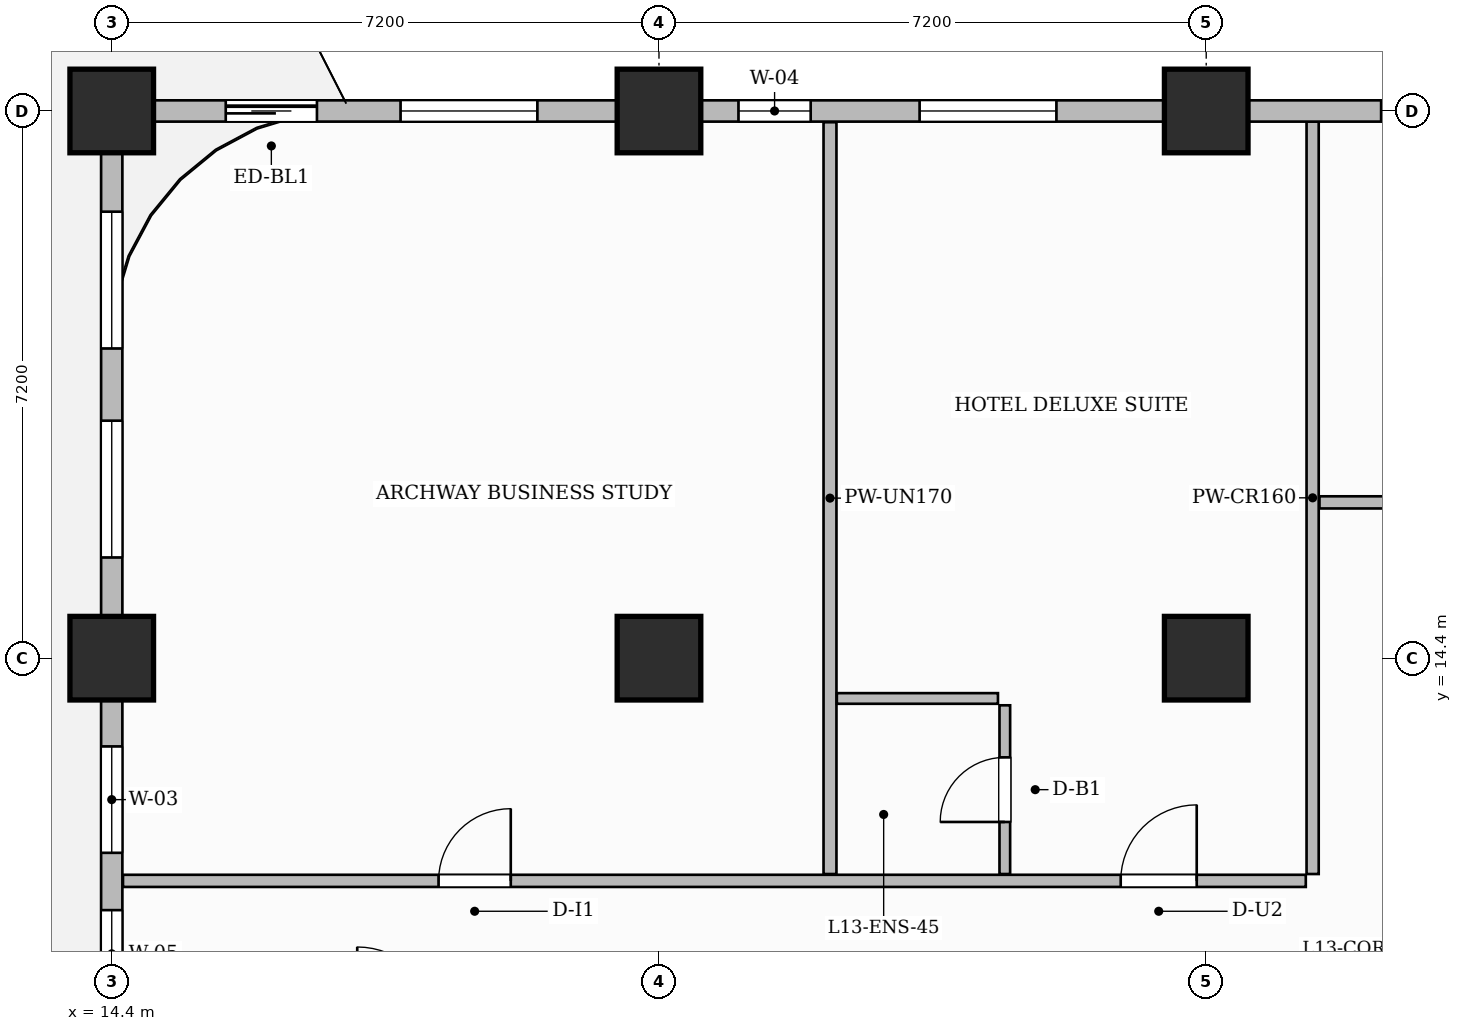
"""IFC4 building model, lengths in metres.
Left out: names, types, materials, properties, quantities, classifications, styles, units other than length and angle.
Written with IfcOpenShell. Run it as: python <this file> out.ifc"""

import sys

from ifc_helpers import new_model, si_unit, direction, frame, frame_2d, origin, origin_2d, place, context, subcontext, project, spatial, rectangle, extrude, source, transform, mapped, element, fill, save


model = new_model("IFC4")
c1 = context("Model", 3, precision=1e-05, world=origin(), true_north=direction((0.0, 1.0)))
c2 = subcontext(c1, "Body", "Model", "MODEL_VIEW")
j1 = project(units=[si_unit("LENGTHUNIT", "METRE"), si_unit("PLANEANGLEUNIT", "RADIAN")], contexts=[c1])
p1 = place(None, origin())
s1 = spatial("IfcSite", under=j1, at=p1, CompositionType="ELEMENT")
p2 = place(p1, origin())
s2 = spatial("IfcBuilding", under=s1, at=p2, CompositionType="ELEMENT")
p3 = place(p2, frame((0.0, 0.0, 58.3)))
s3 = spatial("IfcBuildingStorey", under=s2, at=p3, CompositionType="ELEMENT", Elevation=58.3)
m1 = source(origin(), c2, "Body", "SweptSolid", [
    extrude(rectangle(XDim=1.1, YDim=1.1, at=origin_2d()), origin(), (0.0, 0.0, 1.0), 3.7),
])
for number, where, z_axis, x_axis in (
    (1, (14.4, 14.4, 0.0), (0.0, 0.0, 1.0), (1.0, 0.0, 0.0)),
    (2, (14.4, 21.6, 0.0), (0.0, 0.0, 1.0), (1.0, 0.0, 0.0)),
    (3, (21.6, 14.4, 0.0), (0.0, 0.0, 1.0), (1.0, 0.0, 0.0)),
    (4, (21.6, 21.6, 0.0), (0.0, 0.0, 1.0), (1.0, 0.0, 0.0)),
    (5, (28.8, 14.4, 0.0), (0.0, 0.0, 1.0), (1.0, 0.0, 0.0)),
    (6, (28.8, 21.6, 0.0), (0.0, 0.0, 1.0), (1.0, 0.0, 0.0)),
):
    element("IfcColumn", number, at=place(p3, frame(where, z_axis=z_axis, x_axis=x_axis)), inside=s3, PredefinedType="COLUMN", context=c2, shape_type="MappedRepresentation", body=[
        mapped(m1, transform((0.0, 0.0, 0.0), scale=1.0)),
    ])
p4 = place(p3, frame((14.548, 11.47, 0.0), z_axis=(0.0, 0.0, 1.0), x_axis=(1.0, 0.0, 0.0)))
e7 = element("IfcWall", 7, at=p4, inside=s3, PredefinedType="PARTITIONING", context=c2, shape_type="SweptSolid", body=[
    extrude(rectangle(XDim=15.562, YDim=0.16, at=frame_2d((7.781, 0.0))), origin(), (0.0, 0.0, 1.0), 3.45),
])
p5 = place(p4, frame((4.152, 0.0, 0.0)))
e8 = element("IfcOpeningElement", 8, at=p5, cuts=e7, PredefinedType="OPENING", context=c2, shape_type="SweptSolid", body=[
    extrude(rectangle(XDim=0.95, YDim=2.15, at=frame_2d((0.475, 1.075))), frame((0.0, 0.09, 0.0), z_axis=(0.0, -1.0, 0.0), x_axis=(1.0, 0.0, 0.0)), (0.0, 0.0, 1.0), 0.18),
])
p6 = place(p4, frame((13.127, 0.0, 0.0)))
e9 = element("IfcOpeningElement", 9, at=p6, cuts=e7, PredefinedType="OPENING", context=c2, shape_type="SweptSolid", body=[
    extrude(rectangle(XDim=1.0, YDim=2.2, at=frame_2d((0.5, 1.1))), frame((0.0, 0.09, 0.0), z_axis=(0.0, -1.0, 0.0), x_axis=(1.0, 0.0, 0.0)), (0.0, 0.0, 1.0), 0.18),
])
p7 = place(p3, frame((30.2, 11.56, 0.0), z_axis=(0.0, 0.0, 1.0), x_axis=(0.0, 1.0, 0.0)))
e10 = element("IfcWall", 10, at=p7, inside=s3, PredefinedType="PARTITIONING", context=c2, shape_type="SweptSolid", body=[
    extrude(rectangle(XDim=9.9, YDim=0.16, at=frame_2d((4.95, 0.0))), origin(), (0.0, 0.0, 1.0), 3.45),
])
p8 = place(p3, frame((30.29, 16.45, 0.0), z_axis=(0.0, 0.0, 1.0), x_axis=(1.0, 0.0, 0.0)))
e11 = element("IfcWall", 11, at=p8, inside=s3, PredefinedType="PARTITIONING", context=c2, shape_type="SweptSolid", body=[
    extrude(rectangle(XDim=19.37, YDim=0.16, at=frame_2d((9.685, 0.0))), origin(), (0.0, 0.0, 1.0), 3.45),
])
p9 = place(p8, frame((1.285, 0.0, 0.0)))
e12 = element("IfcOpeningElement", 12, at=p9, cuts=e11, PredefinedType="OPENING", context=c2, shape_type="SweptSolid", body=[
    extrude(rectangle(XDim=0.85, YDim=2.1, at=frame_2d((0.425, 1.05))), frame((0.0, 0.09, 0.0), z_axis=(0.0, -1.0, 0.0), x_axis=(1.0, 0.0, 0.0)), (0.0, 0.0, 1.0), 0.18),
])
p10 = place(p8, frame((10.66, 0.0, 0.0)))
e13 = element("IfcOpeningElement", 13, at=p10, cuts=e11, PredefinedType="OPENING", context=c2, shape_type="SweptSolid", body=[
    extrude(rectangle(XDim=1.6, YDim=2.4, at=frame_2d((0.8, 1.2))), frame((0.0, 0.09, 0.0), z_axis=(0.0, -1.0, 0.0), x_axis=(1.0, 0.0, 0.0)), (0.0, 0.0, 1.0), 0.18),
])
p11 = place(p3, frame((23.85, 11.56, 0.0), z_axis=(0.0, 0.0, 1.0), x_axis=(0.0, 1.0, 0.0)))
e14 = element("IfcWall", 14, at=p11, inside=s3, PredefinedType="PARTITIONING", context=c2, shape_type="SweptSolid", body=[
    extrude(rectangle(XDim=9.892, YDim=0.17, at=frame_2d((4.946, 0.0))), origin(), (0.0, 0.0, 1.0), 3.45),
])
p12 = place(p3, frame((26.15, 11.56, 0.0), z_axis=(0.0, 0.0, 1.0), x_axis=(0.0, 1.0, 0.0)))
e15 = element("IfcWall", 15, at=p12, inside=s3, PredefinedType="PARTITIONING", context=c2, shape_type="SweptSolid", body=[
    extrude(rectangle(XDim=2.22, YDim=0.14, at=frame_2d((1.11, 0.0))), origin(), (0.0, 0.0, 1.0), 3.45),
])
p13 = place(p12, frame((0.685, 0.0, 0.0)))
e16 = element("IfcOpeningElement", 16, at=p13, cuts=e15, PredefinedType="OPENING", context=c2, shape_type="SweptSolid", body=[
    extrude(rectangle(XDim=0.85, YDim=2.1, at=frame_2d((0.425, 1.05))), frame((0.0, 0.08, 0.0), z_axis=(0.0, -1.0, 0.0), x_axis=(1.0, 0.0, 0.0)), (0.0, 0.0, 1.0), 0.16),
])
p14 = place(p3, frame((23.94, 13.87, 0.0), z_axis=(0.0, 0.0, 1.0), x_axis=(1.0, 0.0, 0.0)))
e17 = element("IfcWall", 17, at=p14, inside=s3, PredefinedType="PARTITIONING", context=c2, shape_type="SweptSolid", body=[
    extrude(rectangle(XDim=2.12, YDim=0.14, at=frame_2d((1.06, 0.0))), origin(), (0.0, 0.0, 1.0), 3.45),
])
p15 = place(p3, frame((14.4, 21.6, 0.0), z_axis=(0.0, 0.0, 1.0), x_axis=(1.0, 0.0, 0.0)))
e18 = element("IfcWall", 18, at=p15, inside=s3, PredefinedType="SOLIDWALL", context=c2, shape_type="SweptSolid", body=[
    extrude(rectangle(XDim=43.2, YDim=0.28, at=frame_2d((21.6, 0.0))), origin(), (0.0, 0.0, 1.0), 2.885),
])
p16 = place(p15, frame((1.5, 0.0, 0.0)))
e19 = element("IfcOpeningElement", 19, at=p16, cuts=e18, PredefinedType="OPENING", context=c2, shape_type="SweptSolid", body=[
    extrude(rectangle(XDim=1.2, YDim=2.2, at=frame_2d((0.6, 1.1))), frame((0.0, 0.15, 0.0), z_axis=(0.0, -1.0, 0.0), x_axis=(1.0, 0.0, 0.0)), (0.0, 0.0, 1.0), 0.3),
])
p17 = place(p15, frame((3.8, 0.0, 0.8)))
e20 = element("IfcOpeningElement", 20, at=p17, cuts=e18, PredefinedType="OPENING", context=c2, shape_type="SweptSolid", body=[
    extrude(rectangle(XDim=1.8, YDim=1.85, at=frame_2d((0.9, 0.925))), frame((0.0, 0.15, 0.0), z_axis=(0.0, -1.0, 0.0), x_axis=(1.0, 0.0, 0.0)), (0.0, 0.0, 1.0), 0.3),
])
p18 = place(p15, frame((8.246, 0.0, 0.8)))
e21 = element("IfcOpeningElement", 21, at=p18, cuts=e18, PredefinedType="OPENING", context=c2, shape_type="SweptSolid", body=[
    extrude(rectangle(XDim=0.95, YDim=1.75, at=frame_2d((0.475, 0.875))), frame((0.0, 0.15, 0.0), z_axis=(0.0, -1.0, 0.0), x_axis=(1.0, 0.0, 0.0)), (0.0, 0.0, 1.0), 0.3),
])
p19 = place(p15, frame((10.629, 0.0, 0.8)))
e22 = element("IfcOpeningElement", 22, at=p19, cuts=e18, PredefinedType="OPENING", context=c2, shape_type="SweptSolid", body=[
    extrude(rectangle(XDim=1.8, YDim=1.85, at=frame_2d((0.9, 0.925))), frame((0.0, 0.15, 0.0), z_axis=(0.0, -1.0, 0.0), x_axis=(1.0, 0.0, 0.0)), (0.0, 0.0, 1.0), 0.3),
])
p20 = place(p15, frame((16.701, 0.0, 0.8)))
e23 = element("IfcOpeningElement", 23, at=p20, cuts=e18, PredefinedType="OPENING", context=c2, shape_type="SweptSolid", body=[
    extrude(rectangle(XDim=1.8, YDim=1.85, at=frame_2d((0.9, 0.925))), frame((0.0, 0.15, 0.0), z_axis=(0.0, -1.0, 0.0), x_axis=(1.0, 0.0, 0.0)), (0.0, 0.0, 1.0), 0.3),
])
p21 = place(p15, frame((21.725, 0.0, 0.8)))
e24 = element("IfcOpeningElement", 24, at=p21, cuts=e18, PredefinedType="OPENING", context=c2, shape_type="SweptSolid", body=[
    extrude(rectangle(XDim=1.8, YDim=1.85, at=frame_2d((0.9, 0.925))), frame((0.0, 0.15, 0.0), z_axis=(0.0, -1.0, 0.0), x_axis=(1.0, 0.0, 0.0)), (0.0, 0.0, 1.0), 0.3),
])
p22 = place(p15, frame((24.475, 0.0, 0.8)))
e25 = element("IfcOpeningElement", 25, at=p22, cuts=e18, PredefinedType="OPENING", context=c2, shape_type="SweptSolid", body=[
    extrude(rectangle(XDim=1.8, YDim=1.85, at=frame_2d((0.9, 0.925))), frame((0.0, 0.15, 0.0), z_axis=(0.0, -1.0, 0.0), x_axis=(1.0, 0.0, 0.0)), (0.0, 0.0, 1.0), 0.3),
])
p23 = place(p15, frame((29.075, 0.0, 0.8)))
e26 = element("IfcOpeningElement", 26, at=p23, cuts=e18, PredefinedType="OPENING", context=c2, shape_type="SweptSolid", body=[
    extrude(rectangle(XDim=1.8, YDim=1.85, at=frame_2d((0.9, 0.925))), frame((0.0, 0.15, 0.0), z_axis=(0.0, -1.0, 0.0), x_axis=(1.0, 0.0, 0.0)), (0.0, 0.0, 1.0), 0.3),
])
p24 = place(p15, frame((32.125, 0.0, 0.8)))
e27 = element("IfcOpeningElement", 27, at=p24, cuts=e18, PredefinedType="OPENING", context=c2, shape_type="SweptSolid", body=[
    extrude(rectangle(XDim=1.8, YDim=1.85, at=frame_2d((0.9, 0.925))), frame((0.0, 0.15, 0.0), z_axis=(0.0, -1.0, 0.0), x_axis=(1.0, 0.0, 0.0)), (0.0, 0.0, 1.0), 0.3),
])
p25 = place(p15, frame((36.875, 0.0, 0.8)))
e28 = element("IfcOpeningElement", 28, at=p25, cuts=e18, PredefinedType="OPENING", context=c2, shape_type="SweptSolid", body=[
    extrude(rectangle(XDim=1.8, YDim=1.85, at=frame_2d((0.9, 0.925))), frame((0.0, 0.15, 0.0), z_axis=(0.0, -1.0, 0.0), x_axis=(1.0, 0.0, 0.0)), (0.0, 0.0, 1.0), 0.3),
])
p26 = place(p15, frame((39.925, 0.0, 0.8)))
e29 = element("IfcOpeningElement", 29, at=p26, cuts=e18, PredefinedType="OPENING", context=c2, shape_type="SweptSolid", body=[
    extrude(rectangle(XDim=1.8, YDim=1.85, at=frame_2d((0.9, 0.925))), frame((0.0, 0.15, 0.0), z_axis=(0.0, -1.0, 0.0), x_axis=(1.0, 0.0, 0.0)), (0.0, 0.0, 1.0), 0.3),
])
p27 = place(p3, frame((14.4, 0.05, 0.0), z_axis=(0.0, 0.0, 1.0), x_axis=(0.0, 1.0, 0.0)))
e30 = element("IfcWall", 30, at=p27, inside=s3, PredefinedType="SOLIDWALL", context=c2, shape_type="SweptSolid", body=[
    extrude(rectangle(XDim=21.5, YDim=0.28, at=frame_2d((10.75, 0.0))), origin(), (0.0, 0.0, 1.0), 2.885),
])
p28 = place(p27, frame((1.721, 0.0, 0.8)))
e31 = element("IfcOpeningElement", 31, at=p28, cuts=e30, PredefinedType="OPENING", context=c2, shape_type="SweptSolid", body=[
    extrude(rectangle(XDim=1.8, YDim=1.85, at=frame_2d((0.9, 0.925))), frame((0.0, 0.15, 0.0), z_axis=(0.0, -1.0, 0.0), x_axis=(1.0, 0.0, 0.0)), (0.0, 0.0, 1.0), 0.3),
])
p29 = place(p27, frame((4.854, 0.0, 0.8)))
e32 = element("IfcOpeningElement", 32, at=p29, cuts=e30, PredefinedType="OPENING", context=c2, shape_type="SweptSolid", body=[
    extrude(rectangle(XDim=1.15, YDim=1.8, at=frame_2d((0.575, 0.9))), frame((0.0, 0.15, 0.0), z_axis=(0.0, -1.0, 0.0), x_axis=(1.0, 0.0, 0.0)), (0.0, 0.0, 1.0), 0.3),
])
p30 = place(p27, frame((8.246, 0.0, 0.8)))
e33 = element("IfcOpeningElement", 33, at=p30, cuts=e30, PredefinedType="OPENING", context=c2, shape_type="SweptSolid", body=[
    extrude(rectangle(XDim=0.95, YDim=1.75, at=frame_2d((0.475, 0.875))), frame((0.0, 0.15, 0.0), z_axis=(0.0, -1.0, 0.0), x_axis=(1.0, 0.0, 0.0)), (0.0, 0.0, 1.0), 0.3),
])
p31 = place(p27, frame((9.885, 0.0, 0.8)))
e34 = element("IfcOpeningElement", 34, at=p31, cuts=e30, PredefinedType="OPENING", context=c2, shape_type="SweptSolid", body=[
    extrude(rectangle(XDim=1.15, YDim=1.8, at=frame_2d((0.575, 0.9))), frame((0.0, 0.15, 0.0), z_axis=(0.0, -1.0, 0.0), x_axis=(1.0, 0.0, 0.0)), (0.0, 0.0, 1.0), 0.3),
])
p32 = place(p27, frame((11.789, 0.0, 0.8)))
e35 = element("IfcOpeningElement", 35, at=p32, cuts=e30, PredefinedType="OPENING", context=c2, shape_type="SweptSolid", body=[
    extrude(rectangle(XDim=1.4, YDim=1.85, at=frame_2d((0.7, 0.925))), frame((0.0, 0.15, 0.0), z_axis=(0.0, -1.0, 0.0), x_axis=(1.0, 0.0, 0.0)), (0.0, 0.0, 1.0), 0.3),
])
p33 = place(p27, frame((15.675, 0.0, 0.8)))
e36 = element("IfcOpeningElement", 36, at=p33, cuts=e30, PredefinedType="OPENING", context=c2, shape_type="SweptSolid", body=[
    extrude(rectangle(XDim=1.8, YDim=1.85, at=frame_2d((0.9, 0.925))), frame((0.0, 0.15, 0.0), z_axis=(0.0, -1.0, 0.0), x_axis=(1.0, 0.0, 0.0)), (0.0, 0.0, 1.0), 0.3),
])
p34 = place(p27, frame((18.425, 0.0, 0.8)))
e37 = element("IfcOpeningElement", 37, at=p34, cuts=e30, PredefinedType="OPENING", context=c2, shape_type="SweptSolid", body=[
    extrude(rectangle(XDim=1.8, YDim=1.85, at=frame_2d((0.9, 0.925))), frame((0.0, 0.15, 0.0), z_axis=(0.0, -1.0, 0.0), x_axis=(1.0, 0.0, 0.0)), (0.0, 0.0, 1.0), 0.3),
])
m2 = source(origin(), c2, "Body", "SweptSolid", [
    extrude(rectangle(XDim=0.95, YDim=2.15, at=frame_2d((0.475, 1.075))), frame((0.0, 0.025, 0.0), z_axis=(0.0, -1.0, 0.0), x_axis=(1.0, 0.0, 0.0)), (0.0, 0.0, 1.0), 0.05),
])
p35 = place(p5, origin())
e38 = element("IfcDoor", 38, at=p35, inside=s3, OperationType="SINGLE_SWING_RIGHT", PredefinedType="DOOR", context=c2, shape_type="MappedRepresentation", body=[
    mapped(m2, transform((0.0, 0.0, 0.0), scale=1.0)),
])
fill(e8, e38)
m3 = source(origin(), c2, "Body", "SweptSolid", [
    extrude(rectangle(XDim=0.85, YDim=2.1, at=frame_2d((0.425, 1.05))), frame((0.0, 0.025, 0.0), z_axis=(0.0, -1.0, 0.0), x_axis=(1.0, 0.0, 0.0)), (0.0, 0.0, 1.0), 0.05),
])
p36 = place(p13, origin())
e39 = element("IfcDoor", 39, at=p36, inside=s3, OperationType="SINGLE_SWING_LEFT", PredefinedType="DOOR", context=c2, shape_type="MappedRepresentation", body=[
    mapped(m3, transform((0.0, 0.0, 0.0), scale=1.0)),
])
fill(e16, e39)
m4 = source(origin(), c2, "Body", "SweptSolid", [
    extrude(rectangle(XDim=1.0, YDim=2.2, at=frame_2d((0.5, 1.1))), frame((0.0, 0.025, 0.0), z_axis=(0.0, -1.0, 0.0), x_axis=(1.0, 0.0, 0.0)), (0.0, 0.0, 1.0), 0.05),
])
p37 = place(p6, origin())
e40 = element("IfcDoor", 40, at=p37, inside=s3, OperationType="SINGLE_SWING_RIGHT", PredefinedType="DOOR", context=c2, shape_type="MappedRepresentation", body=[
    mapped(m4, transform((0.0, 0.0, 0.0), scale=1.0)),
])
fill(e9, e40)
m5 = source(origin(), c2, "Body", "SweptSolid", [
    extrude(rectangle(XDim=1.2, YDim=2.2, at=frame_2d((0.6, 1.1))), frame((0.0, 0.025, 0.0), z_axis=(0.0, -1.0, 0.0), x_axis=(1.0, 0.0, 0.0)), (0.0, 0.0, 1.0), 0.05),
])
p38 = place(p16, origin())
e41 = element("IfcDoor", 41, at=p38, inside=s3, OperationType="SLIDING_TO_LEFT", PredefinedType="DOOR", context=c2, shape_type="MappedRepresentation", body=[
    mapped(m5, transform((0.0, 0.0, 0.0), scale=1.0)),
])
fill(e19, e41)
m6 = source(origin(), c2, "Body", "SweptSolid", [
    extrude(rectangle(XDim=1.8, YDim=1.85, at=frame_2d((0.9, 0.925))), frame((0.0, 0.03, 0.0), z_axis=(0.0, -1.0, 0.0), x_axis=(1.0, 0.0, 0.0)), (0.0, 0.0, 1.0), 0.06),
])
p39 = place(p17, origin())
e42 = element("IfcWindow", 42, at=p39, inside=s3, PartitioningType="DOUBLE_PANEL_VERTICAL", PredefinedType="WINDOW", context=c2, shape_type="MappedRepresentation", body=[
    mapped(m6, transform((0.0, 0.0, 0.0), scale=1.0)),
])
fill(e20, e42)
m7 = source(origin(), c2, "Body", "SweptSolid", [
    extrude(rectangle(XDim=0.95, YDim=1.75, at=frame_2d((0.475, 0.875))), frame((0.0, 0.03, 0.0), z_axis=(0.0, -1.0, 0.0), x_axis=(1.0, 0.0, 0.0)), (0.0, 0.0, 1.0), 0.06),
])
p40 = place(p18, origin())
e43 = element("IfcWindow", 43, at=p40, inside=s3, PartitioningType="SINGLE_PANEL", PredefinedType="WINDOW", context=c2, shape_type="MappedRepresentation", body=[
    mapped(m7, transform((0.0, 0.0, 0.0), scale=1.0)),
])
fill(e21, e43)
p41 = place(p19, origin())
e44 = element("IfcWindow", 44, at=p41, inside=s3, PartitioningType="DOUBLE_PANEL_VERTICAL", PredefinedType="WINDOW", context=c2, shape_type="MappedRepresentation", body=[
    mapped(m6, transform((0.0, 0.0, 0.0), scale=1.0)),
])
fill(e22, e44)
p42 = place(p20, origin())
e45 = element("IfcWindow", 45, at=p42, inside=s3, PartitioningType="DOUBLE_PANEL_VERTICAL", PredefinedType="WINDOW", context=c2, shape_type="MappedRepresentation", body=[
    mapped(m6, transform((0.0, 0.0, 0.0), scale=1.0)),
])
fill(e23, e45)
m8 = source(origin(), c2, "Body", "SweptSolid", [
    extrude(rectangle(XDim=1.15, YDim=1.8, at=frame_2d((0.575, 0.9))), frame((0.0, 0.03, 0.0), z_axis=(0.0, -1.0, 0.0), x_axis=(1.0, 0.0, 0.0)), (0.0, 0.0, 1.0), 0.06),
])
p43 = place(p31, origin())
e46 = element("IfcWindow", 46, at=p43, inside=s3, PartitioningType="SINGLE_PANEL", PredefinedType="WINDOW", context=c2, shape_type="MappedRepresentation", body=[
    mapped(m8, transform((0.0, 0.0, 0.0), scale=1.0)),
])
fill(e34, e46)
m9 = source(origin(), c2, "Body", "SweptSolid", [
    extrude(rectangle(XDim=1.4, YDim=1.85, at=frame_2d((0.7, 0.925))), frame((0.0, 0.03, 0.0), z_axis=(0.0, -1.0, 0.0), x_axis=(1.0, 0.0, 0.0)), (0.0, 0.0, 1.0), 0.06),
])
p44 = place(p32, origin())
e47 = element("IfcWindow", 47, at=p44, inside=s3, PartitioningType="SINGLE_PANEL", PredefinedType="WINDOW", context=c2, shape_type="MappedRepresentation", body=[
    mapped(m9, transform((0.0, 0.0, 0.0), scale=1.0)),
])
fill(e35, e47)
p45 = place(p33, origin())
e48 = element("IfcWindow", 48, at=p45, inside=s3, PartitioningType="DOUBLE_PANEL_VERTICAL", PredefinedType="WINDOW", context=c2, shape_type="MappedRepresentation", body=[
    mapped(m6, transform((0.0, 0.0, 0.0), scale=1.0)),
])
fill(e36, e48)
p46 = place(p34, origin())
e49 = element("IfcWindow", 49, at=p46, inside=s3, PartitioningType="DOUBLE_PANEL_VERTICAL", PredefinedType="WINDOW", context=c2, shape_type="MappedRepresentation", body=[
    mapped(m6, transform((0.0, 0.0, 0.0), scale=1.0)),
])
fill(e37, e49)
save(model, sys.argv[1])
